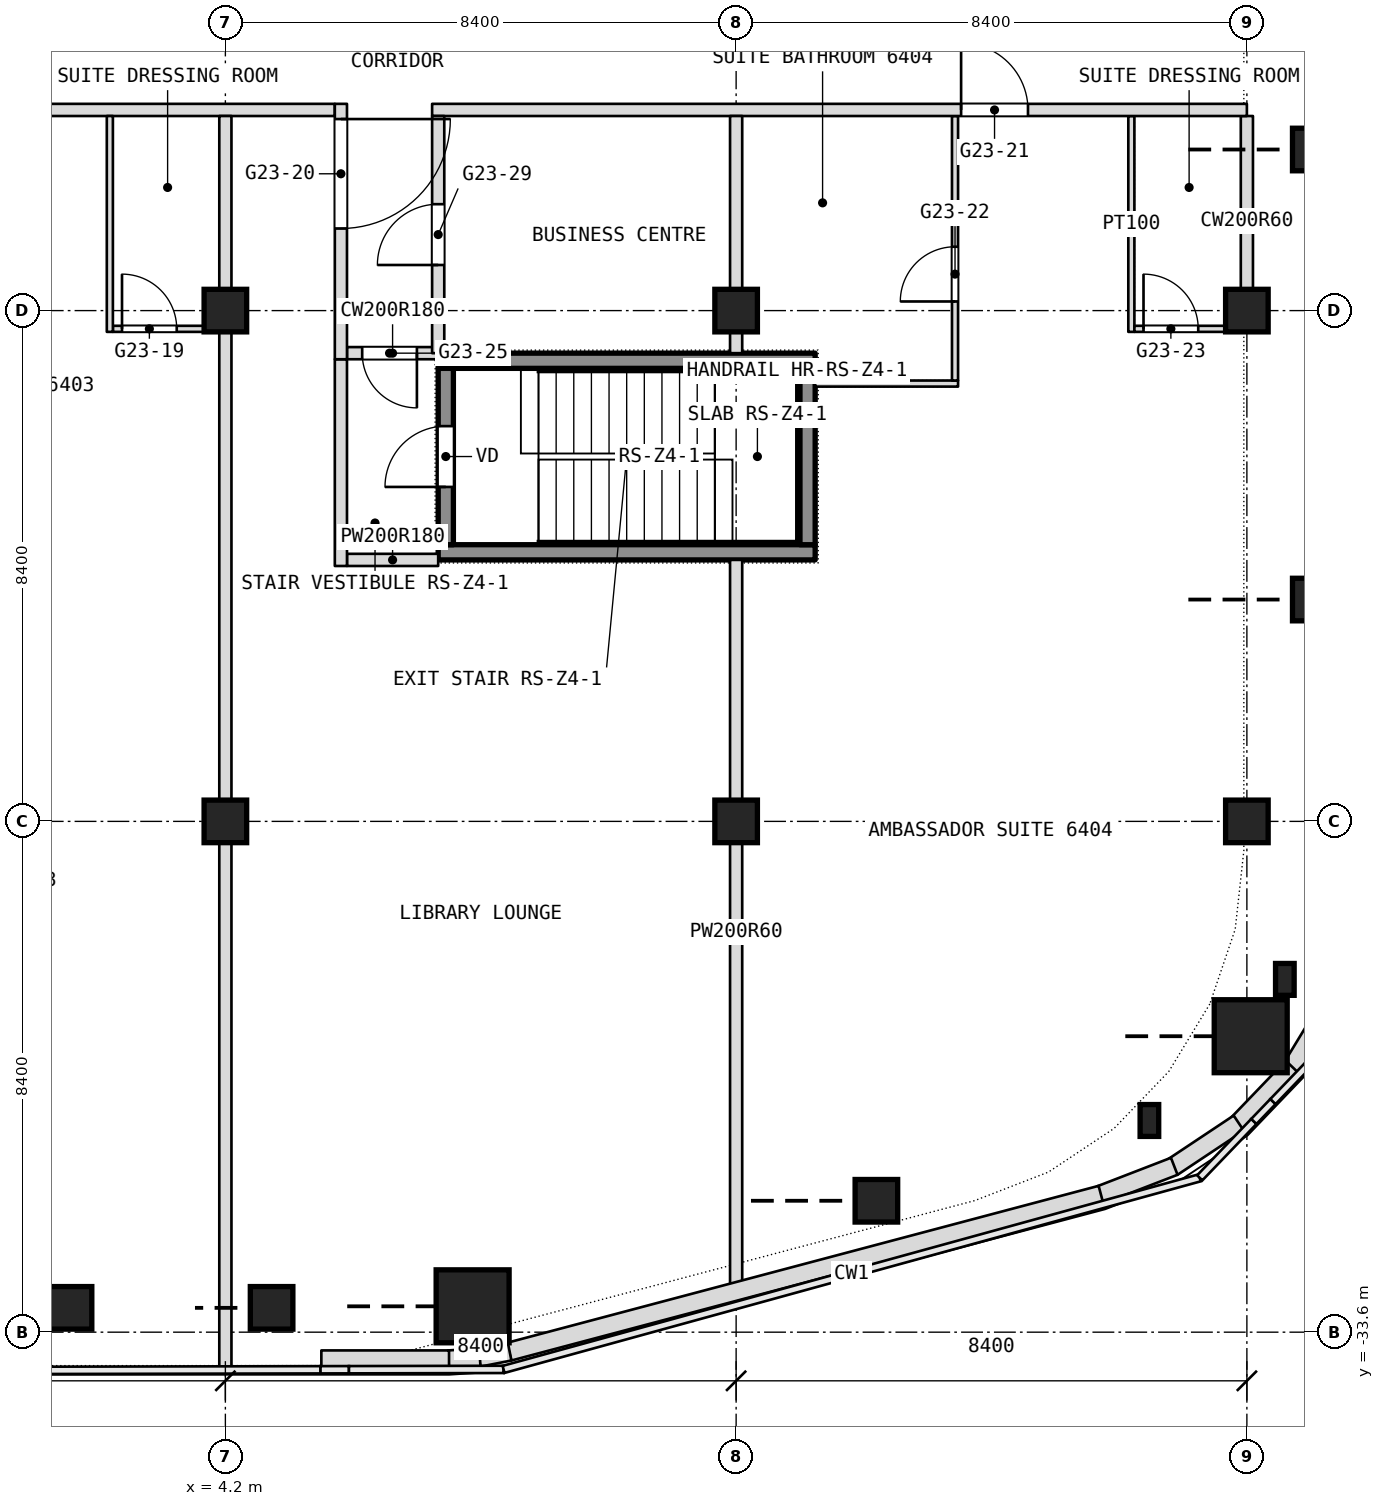
"""IFC4 building model, lengths in metres.
Left out: names, types, materials, properties, quantities, classifications, styles, units other than length and angle.
Written with IfcOpenShell. Run it as: python <this file> out.ifc"""

import sys

from ifc_helpers import new_model, si_unit, direction, frame, frame_2d, origin, origin_2d, place, context, subcontext, project, spatial, rectangle, i_section, extrude, element, fill, save


model = new_model("IFC4")
c1 = context("Model", 3, precision=1e-05, world=origin(), true_north=direction((0.0, 1.0)))
c2 = subcontext(c1, "Body", "Model", "MODEL_VIEW")
j1 = project(units=[si_unit("LENGTHUNIT", "METRE"), si_unit("PLANEANGLEUNIT", "RADIAN")], contexts=[c1])
p1 = place(None, origin())
s1 = spatial("IfcSite", under=j1, at=p1, CompositionType="ELEMENT")
p2 = place(p1, origin())
s2 = spatial("IfcBuilding", under=s1, at=p2, CompositionType="ELEMENT")
p3 = place(p2, frame((0.0, 0.0, 277.7)))
s3 = spatial("IfcBuildingStorey", under=s2, at=p3, CompositionType="ELEMENT", Elevation=277.7)
for number, where, z_axis, x_axis in (
    (1, (4.2, -25.2, 0.0), (0.0, 0.0, 1.0), (1.0, 0.0, 0.0)),
    (2, (4.2, -16.8, 0.0), (0.0, 0.0, 1.0), (1.0, 0.0, 0.0)),
    (3, (12.6, -25.2, 0.0), (0.0, 0.0, 1.0), (1.0, 0.0, 0.0)),
    (4, (12.6, -16.8, 0.0), (0.0, 0.0, 1.0), (1.0, 0.0, 0.0)),
):
    element("IfcColumn", number, at=place(p3, frame(where, z_axis=z_axis, x_axis=x_axis)), inside=s3, PredefinedType="COLUMN", context=c2, shape_type="SweptSolid", body=[
        extrude(rectangle(XDim=0.7, YDim=0.7, at=origin_2d()), origin(), (0.0, 0.0, 1.0), 3.6),
    ])
for number, where, z_axis, x_axis in (
    (5, (21.0, -25.2, 0.0), (0.0, 0.0, 1.0), (1.0, 0.0, 0.0)),
    (6, (21.0, -16.8, 0.0), (0.0, 0.0, 1.0), (1.0, 0.0, 0.0)),
):
    element("IfcColumn", number, at=place(p3, frame(where, z_axis=z_axis, x_axis=x_axis)), inside=s3, PredefinedType="COLUMN", context=c2, shape_type="SweptSolid", body=[
        extrude(rectangle(XDim=0.7, YDim=0.7, at=origin_2d()), origin(), (0.0, 0.0, 1.0), 3.34),
    ])
for number, where, z_axis, x_axis in (
    (7, (22.1, -14.151, 0.0), (0.0, 0.0, 1.0), (1.0, 0.0, 0.0)),
    (8, (22.1, -21.552, 0.0), (0.0, 0.0, 1.0), (1.0, 0.0, 0.0)),
):
    element("IfcColumn", number, at=place(p3, frame(where, z_axis=z_axis, x_axis=x_axis)), inside=s3, PredefinedType="COLUMN", context=c2, shape_type="SweptSolid", body=[
        extrude(i_section(OverallWidth=0.306, OverallDepth=0.524, WebThickness=0.024, FlangeThickness=0.04, FilletRadius=0.027, at=origin_2d()), origin(), (0.0, 0.0, 1.0), 2.94),
    ])
p4 = place(p3, frame((21.625, -27.799, -0.26), z_axis=(0.0, 0.0, 1.0), x_axis=(1.0, 0.0, 0.0)))
e9 = element("IfcColumn", 9, at=p4, inside=s3, PredefinedType="COLUMN", context=c2, shape_type="SweptSolid", body=[
    extrude(i_section(OverallWidth=0.306, OverallDepth=0.524, WebThickness=0.024, FlangeThickness=0.04, FilletRadius=0.027, at=origin_2d()), origin(), (0.0, 0.0, 1.0), 3.2),
])
p5 = place(p3, frame((21.063, -28.733, 0.0), z_axis=(0.0, 0.0, 1.0), x_axis=(1.0, 0.0, 0.0)))
e10 = element("IfcColumn", 10, at=p5, inside=s3, PredefinedType="COLUMN", context=c2, shape_type="SweptSolid", body=[
    extrude(i_section(OverallWidth=0.306, OverallDepth=0.524, WebThickness=0.024, FlangeThickness=0.04, FilletRadius=0.027, at=origin_2d()), origin(), (0.0, 0.0, 1.0), 2.94),
])
p6 = place(p3, frame((19.397, -30.119, -0.26), z_axis=(0.0, 0.0, 1.0), x_axis=(1.0, 0.0, 0.0)))
e11 = element("IfcColumn", 11, at=p6, inside=s3, PredefinedType="COLUMN", context=c2, shape_type="SweptSolid", body=[
    extrude(i_section(OverallWidth=0.306, OverallDepth=0.524, WebThickness=0.024, FlangeThickness=0.04, FilletRadius=0.027, at=origin_2d()), origin(), (0.0, 0.0, 1.0), 3.2),
])
for number, where, z_axis, x_axis in (
    (12, (14.907, -31.439, 0.0), (0.0, 0.0, 1.0), (1.0, 0.0, 0.0)),
    (13, (8.266, -33.173, 0.0), (0.0, 0.0, 1.0), (1.0, 0.0, 0.0)),
):
    element("IfcColumn", number, at=place(p3, frame(where, z_axis=z_axis, x_axis=x_axis)), inside=s3, PredefinedType="COLUMN", context=c2, shape_type="SweptSolid", body=[
        extrude(i_section(OverallWidth=0.306, OverallDepth=0.524, WebThickness=0.024, FlangeThickness=0.04, FilletRadius=0.027, at=origin_2d()), origin(), (0.0, 0.0, 1.0), 2.94),
    ])
p7 = place(p3, frame((21.0, -17.05, 0.0), z_axis=(0.0, 0.0, 1.0), x_axis=(0.0, 1.0, 0.0)))
e14 = element("IfcWall", 14, at=p7, inside=s3, PredefinedType="PARTITIONING", context=c2, shape_type="SweptSolid", body=[
    extrude(rectangle(XDim=3.45, YDim=0.2, at=frame_2d((1.725, 0.0))), origin(), (0.0, 0.0, 1.0), 3.34),
])
p8 = place(p3, frame((6.2, -20.9, 0.0), z_axis=(0.0, 0.0, 1.0), x_axis=(1.0, 0.0, 0.0)))
e15 = element("IfcWall", 15, at=p8, inside=s3, PredefinedType="PARTITIONING", context=c2, shape_type="SweptSolid", body=[
    extrude(rectangle(XDim=1.5, YDim=0.2, at=frame_2d((0.75, 0.0))), origin(), (0.0, 0.0, 1.0), 3.34),
])
p9 = place(p3, frame((19.1, -17.15, 0.0), z_axis=(0.0, 0.0, 1.0), x_axis=(0.0, 1.0, 0.0)))
e16 = element("IfcWall", 16, at=p9, inside=s3, PredefinedType="PARTITIONING", context=c2, shape_type="SweptSolid", body=[
    extrude(rectangle(XDim=3.55, YDim=0.1, at=frame_2d((1.775, 0.0))), origin(), (0.0, 0.0, 1.0), 3.34),
])
p10 = place(p3, frame((13.9, -18.0, 0.0), z_axis=(0.0, 0.0, 1.0), x_axis=(1.0, 0.0, 0.0)))
e17 = element("IfcWall", 17, at=p10, inside=s3, PredefinedType="PARTITIONING", context=c2, shape_type="SweptSolid", body=[
    extrude(rectangle(XDim=2.35, YDim=0.1, at=frame_2d((1.175, 0.0))), origin(), (0.0, 0.0, 1.0), 3.34),
])
p11 = place(p3, frame((6.2, -17.5, 0.0), z_axis=(0.0, 0.0, 1.0), x_axis=(1.0, 0.0, 0.0)))
e18 = element("IfcWall", 18, at=p11, inside=s3, PredefinedType="PARTITIONING", context=c2, shape_type="SweptSolid", body=[
    extrude(rectangle(XDim=1.5, YDim=0.2, at=frame_2d((0.75, 0.0))), origin(), (0.0, 0.0, 1.0), 3.34),
])
p12 = place(p11, frame((0.25, 0.0, 0.0)))
e19 = element("IfcOpeningElement", 19, at=p12, cuts=e18, PredefinedType="OPENING", context=c2, shape_type="SweptSolid", body=[
    extrude(rectangle(XDim=0.9, YDim=2.1, at=frame_2d((0.45, 1.05))), frame((0.0, 0.1, 0.0), z_axis=(0.0, -1.0, 0.0), x_axis=(1.0, 0.0, 0.0)), (0.0, 0.0, 1.0), 0.2),
])
p13 = place(p3, frame((2.35, -17.1, 0.0), z_axis=(0.0, 0.0, 1.0), x_axis=(1.0, 0.0, 0.0)))
e20 = element("IfcWall", 20, at=p13, inside=s3, PredefinedType="PARTITIONING", context=c2, shape_type="SweptSolid", body=[
    extrude(rectangle(XDim=1.95, YDim=0.1, at=frame_2d((0.975, 0.0))), origin(), (0.0, 0.0, 1.0), 3.34),
])
p14 = place(p13, frame((0.15, 0.0, 0.0)))
e21 = element("IfcOpeningElement", 21, at=p14, cuts=e20, PredefinedType="OPENING", context=c2, shape_type="SweptSolid", body=[
    extrude(rectangle(XDim=0.9, YDim=2.1, at=frame_2d((0.45, 1.05))), frame((0.0, 0.05, 0.0), z_axis=(0.0, -1.0, 0.0), x_axis=(1.0, 0.0, 0.0)), (0.0, 0.0, 1.0), 0.1),
])
p15 = place(p3, frame((19.15, -17.1, 0.0), z_axis=(0.0, 0.0, 1.0), x_axis=(1.0, 0.0, 0.0)))
e22 = element("IfcWall", 22, at=p15, inside=s3, PredefinedType="PARTITIONING", context=c2, shape_type="SweptSolid", body=[
    extrude(rectangle(XDim=1.85, YDim=0.1, at=frame_2d((0.925, 0.0))), origin(), (0.0, 0.0, 1.0), 3.34),
])
p16 = place(p15, frame((0.15, 0.0, 0.0)))
e23 = element("IfcOpeningElement", 23, at=p16, cuts=e22, PredefinedType="OPENING", context=c2, shape_type="SweptSolid", body=[
    extrude(rectangle(XDim=0.9, YDim=2.1, at=frame_2d((0.45, 1.05))), frame((0.0, 0.05, 0.0), z_axis=(0.0, -1.0, 0.0), x_axis=(1.0, 0.0, 0.0)), (0.0, 0.0, 1.0), 0.1),
])
p17 = place(p3, frame((16.2, -17.95, 0.0), z_axis=(0.0, 0.0, 1.0), x_axis=(0.0, 1.0, 0.0)))
e24 = element("IfcWall", 24, at=p17, inside=s3, PredefinedType="PARTITIONING", context=c2, shape_type="SweptSolid", body=[
    extrude(rectangle(XDim=4.35, YDim=0.1, at=frame_2d((2.175, 0.0))), origin(), (0.0, 0.0, 1.0), 3.34),
])
p18 = place(p17, frame((1.3, 0.0, 0.0)))
e25 = element("IfcOpeningElement", 25, at=p18, cuts=e24, PredefinedType="OPENING", context=c2, shape_type="SweptSolid", body=[
    extrude(rectangle(XDim=0.9, YDim=2.1, at=frame_2d((0.45, 1.05))), frame((0.0, 0.05, 0.0), z_axis=(0.0, -1.0, 0.0), x_axis=(1.0, 0.0, 0.0)), (0.0, 0.0, 1.0), 0.1),
])
p19 = place(p3, frame((-10.0, -13.5, 0.0), z_axis=(0.0, 0.0, 1.0), x_axis=(1.0, 0.0, 0.0)))
e26 = element("IfcWall", 26, at=p19, inside=s3, PredefinedType="PARTITIONING", context=c2, shape_type="SweptSolid", body=[
    extrude(rectangle(XDim=16.0, YDim=0.2, at=frame_2d((8.0, 0.0))), origin(), (0.0, 0.0, 1.0), 3.34),
])
p20 = place(p19, frame((0.25, 0.0, 0.0)))
e27 = element("IfcOpeningElement", 27, at=p20, cuts=e26, PredefinedType="OPENING", context=c2, shape_type="SweptSolid", body=[
    extrude(rectangle(XDim=1.1, YDim=2.1, at=frame_2d((0.55, 1.05))), frame((0.0, 0.1, 0.0), z_axis=(0.0, -1.0, 0.0), x_axis=(1.0, 0.0, 0.0)), (0.0, 0.0, 1.0), 0.2),
])
p21 = place(p19, frame((9.5, 0.0, 0.0)))
e28 = element("IfcOpeningElement", 28, at=p21, cuts=e26, PredefinedType="OPENING", context=c2, shape_type="SweptSolid", body=[
    extrude(rectangle(XDim=1.1, YDim=2.1, at=frame_2d((0.55, 1.05))), frame((0.0, 0.1, 0.0), z_axis=(0.0, -1.0, 0.0), x_axis=(1.0, 0.0, 0.0)), (0.0, 0.0, 1.0), 0.2),
])
p22 = place(p3, frame((7.6, -13.5, 0.0), z_axis=(0.0, 0.0, 1.0), x_axis=(1.0, 0.0, 0.0)))
e29 = element("IfcWall", 29, at=p22, inside=s3, PredefinedType="PARTITIONING", context=c2, shape_type="SweptSolid", body=[
    extrude(rectangle(XDim=13.4, YDim=0.2, at=frame_2d((6.7, 0.0))), origin(), (0.0, 0.0, 1.0), 3.34),
])
p23 = place(p22, frame((8.7, 0.0, 0.0)))
e30 = element("IfcOpeningElement", 30, at=p23, cuts=e29, PredefinedType="OPENING", context=c2, shape_type="SweptSolid", body=[
    extrude(rectangle(XDim=1.1, YDim=2.1, at=frame_2d((0.55, 1.05))), frame((0.0, 0.1, 0.0), z_axis=(0.0, -1.0, 0.0), x_axis=(1.0, 0.0, 0.0)), (0.0, 0.0, 1.0), 0.2),
])
p24 = place(p3, frame((12.6, -33.13, 0.0), z_axis=(0.0, 0.0, 1.0), x_axis=(0.0, 1.0, 0.0)))
e31 = element("IfcWall", 31, at=p24, inside=s3, PredefinedType="PARTITIONING", context=c2, shape_type="SweptSolid", body=[
    extrude(rectangle(XDim=12.23, YDim=0.2, at=frame_2d((6.115, 0.0))), origin(), (0.0, 0.0, 1.0), 3.34),
])
p25 = place(p3, frame((12.6, -17.5, 0.0), z_axis=(0.0, 0.0, 1.0), x_axis=(0.0, 1.0, 0.0)))
e32 = element("IfcWall", 32, at=p25, inside=s3, PredefinedType="PARTITIONING", context=c2, shape_type="SweptSolid", body=[
    extrude(rectangle(XDim=3.9, YDim=0.2, at=frame_2d((1.95, 0.0))), origin(), (0.0, 0.0, 1.0), 3.34),
])
p26 = place(p3, frame((7.7, -17.5, 0.0), z_axis=(0.0, 0.0, 1.0), x_axis=(0.0, 1.0, 0.0)))
e33 = element("IfcWall", 33, at=p26, inside=s3, PredefinedType="PARTITIONING", context=c2, shape_type="SweptSolid", body=[
    extrude(rectangle(XDim=3.9, YDim=0.2, at=frame_2d((1.95, 0.0))), origin(), (0.0, 0.0, 1.0), 3.34),
])
p27 = place(p26, frame((1.45, 0.0, 0.0)))
e34 = element("IfcOpeningElement", 34, at=p27, cuts=e33, PredefinedType="OPENING", context=c2, shape_type="SweptSolid", body=[
    extrude(rectangle(XDim=1.0, YDim=2.1, at=frame_2d((0.5, 1.05))), frame((0.0, 0.1, 0.0), z_axis=(0.0, -1.0, 0.0), x_axis=(1.0, 0.0, 0.0)), (0.0, 0.0, 1.0), 0.2),
])
p28 = place(p3, frame((6.1, -21.0, 0.0), z_axis=(0.0, 0.0, 1.0), x_axis=(0.0, 1.0, 0.0)))
e35 = element("IfcWall", 35, at=p28, inside=s3, PredefinedType="PARTITIONING", context=c2, shape_type="SweptSolid", body=[
    extrude(rectangle(XDim=3.4, YDim=0.2, at=frame_2d((1.7, 0.0))), origin(), (0.0, 0.0, 1.0), 3.34),
])
p29 = place(p3, frame((6.1, -17.6, 0.0), z_axis=(0.0, 0.0, 1.0), x_axis=(0.0, 1.0, 0.0)))
e36 = element("IfcWall", 36, at=p29, inside=s3, PredefinedType="PARTITIONING", context=c2, shape_type="SweptSolid", body=[
    extrude(rectangle(XDim=4.2, YDim=0.2, at=frame_2d((2.1, 0.0))), origin(), (0.0, 0.0, 1.0), 3.34),
])
p30 = place(p29, frame((2.15, 0.0, 0.0)))
e37 = element("IfcOpeningElement", 37, at=p30, cuts=e36, PredefinedType="OPENING", context=c2, shape_type="SweptSolid", body=[
    extrude(rectangle(XDim=1.8, YDim=2.1, at=frame_2d((0.9, 1.05))), frame((0.0, 0.1, 0.0), z_axis=(0.0, -1.0, 0.0), x_axis=(1.0, 0.0, 0.0)), (0.0, 0.0, 1.0), 0.2),
])
p31 = place(p3, frame((4.2, -34.2, 0.0), z_axis=(0.0, 0.0, 1.0), x_axis=(0.0, 1.0, 0.0)))
e38 = element("IfcWall", 38, at=p31, inside=s3, PredefinedType="PARTITIONING", context=c2, shape_type="SweptSolid", body=[
    extrude(rectangle(XDim=20.6, YDim=0.2, at=frame_2d((10.3, 0.0))), origin(), (0.0, 0.0, 1.0), 3.34),
])
p32 = place(p3, frame((2.3, -17.15, 0.0), z_axis=(0.0, 0.0, 1.0), x_axis=(0.0, 1.0, 0.0)))
e39 = element("IfcWall", 39, at=p32, inside=s3, PredefinedType="PARTITIONING", context=c2, shape_type="SweptSolid", body=[
    extrude(rectangle(XDim=3.55, YDim=0.1, at=frame_2d((1.775, 0.0))), origin(), (0.0, 0.0, 1.0), 3.34),
])
p33 = place(p3, frame((22.408, -28.146, 3.6), z_axis=(0.0, 0.0, 1.0), x_axis=(-0.519751696049, -0.854317373377, 0.0)))
e40 = element("IfcWall", 40, at=p33, inside=s3, PredefinedType="PARAPET", context=c2, shape_type="SweptSolid", body=[
    extrude(rectangle(XDim=1.309, YDim=0.3, at=frame_2d((0.655, 0.0))), origin(), (0.0, 0.0, 1.0), 1.1),
])
p34 = place(p3, frame((21.747, -29.239, 3.6), z_axis=(0.0, 0.0, 1.0), x_axis=(-0.692407566653, -0.721506591544, 0.0)))
e41 = element("IfcWall", 41, at=p34, inside=s3, PredefinedType="PARAPET", context=c2, shape_type="SweptSolid", body=[
    extrude(rectangle(XDim=1.309, YDim=0.3, at=frame_2d((0.654, 0.0))), origin(), (0.0, 0.0, 1.0), 1.1),
])
p35 = place(p3, frame((20.866, -30.162, 3.6), z_axis=(0.0, 0.0, 1.0), x_axis=(-0.832566414073, -0.55392523517, 0.0)))
e42 = element("IfcWall", 42, at=p35, inside=s3, PredefinedType="PARAPET", context=c2, shape_type="SweptSolid", body=[
    extrude(rectangle(XDim=1.309, YDim=0.3, at=frame_2d((0.655, 0.0))), origin(), (0.0, 0.0, 1.0), 1.1),
])
p36 = place(p3, frame((19.805, -30.872, 3.6), z_axis=(0.0, 0.0, 1.0), x_axis=(-0.932786730883, -0.360428792813, 0.0)))
e43 = element("IfcWall", 43, at=p36, inside=s3, PredefinedType="PARAPET", context=c2, shape_type="SweptSolid", body=[
    extrude(rectangle(XDim=1.309, YDim=0.3, at=frame_2d((0.654, 0.0))), origin(), (0.0, 0.0, 1.0), 1.1),
])
p37 = place(p3, frame((18.6, -31.339, 3.6), z_axis=(0.0, 0.0, 1.0), x_axis=(-0.966564868529, -0.256422220031, 0.0)))
e44 = element("IfcWall", 44, at=p37, inside=s3, PredefinedType="PARAPET", context=c2, shape_type="SweptSolid", body=[
    extrude(rectangle(XDim=10.071, YDim=0.3, at=frame_2d((5.036, 0.0))), origin(), (0.0, 0.0, 1.0), 1.1),
])
p38 = place(p3, frame((8.875, -33.919, 3.6), z_axis=(0.0, 0.0, 1.0), x_axis=(-0.981066960595, -0.193668838043, 0.0)))
e45 = element("IfcWall", 45, at=p38, inside=s3, PredefinedType="PARAPET", context=c2, shape_type="SweptSolid", body=[
    extrude(rectangle(XDim=0.518, YDim=0.3, at=frame_2d((0.259, 0.0))), origin(), (0.0, 0.0, 1.0), 1.1),
])
p39 = place(p3, frame((8.386, -34.017, 3.6), z_axis=(0.0, 0.0, 1.0), x_axis=(-0.997886085242, -0.064987390167, 0.0)))
e46 = element("IfcWall", 46, at=p39, inside=s3, PredefinedType="PARAPET", context=c2, shape_type="SweptSolid", body=[
    extrude(rectangle(XDim=0.518, YDim=0.3, at=frame_2d((0.259, 0.0))), origin(), (0.0, 0.0, 1.0), 1.1),
])
p40 = place(p3, frame((7.878, -34.05, 3.6), z_axis=(0.0, 0.0, 1.0), x_axis=(-1.0, 0.0, 0.0)))
e47 = element("IfcWall", 47, at=p40, inside=s3, PredefinedType="PARAPET", context=c2, shape_type="SweptSolid", body=[
    extrude(rectangle(XDim=2.1, YDim=0.3, at=frame_2d((1.05, 0.0))), origin(), (0.0, 0.0, 1.0), 1.1),
])
for number, where, z_axis, x_axis in (
    (48, (7.7, -20.775, 0.1), (0.0, 0.0, 1.0), (1.0, 0.0, 0.0)),
    (49, (7.7, -17.625, 0.1), (0.0, 0.0, 1.0), (1.0, 0.0, 0.0)),
):
    element("IfcWall", number, at=place(p3, frame(where, z_axis=z_axis, x_axis=x_axis)), inside=s3, PredefinedType="SHEAR", context=c2, shape_type="SweptSolid", body=[
        extrude(rectangle(XDim=6.2, YDim=0.25, at=frame_2d((3.1, 0.0))), origin(), (0.0, 0.0, 1.0), 3.6),
    ])
p41 = place(p3, frame((7.825, -20.65, 0.1), z_axis=(0.0, 0.0, 1.0), x_axis=(0.0, 1.0, 0.0)))
e50 = element("IfcWall", 50, at=p41, inside=s3, PredefinedType="SHEAR", context=c2, shape_type="SweptSolid", body=[
    extrude(rectangle(XDim=2.9, YDim=0.25, at=frame_2d((1.45, 0.0))), origin(), (0.0, 0.0, 1.0), 3.6),
])
p42 = place(p41, frame((0.95, 0.0, 0.0)))
e51 = element("IfcOpeningElement", 51, at=p42, cuts=e50, PredefinedType="OPENING", context=c2, shape_type="SweptSolid", body=[
    extrude(rectangle(XDim=1.0, YDim=2.1, at=frame_2d((0.5, 1.05))), frame((0.0, 0.125, 0.0), z_axis=(0.0, -1.0, 0.0), x_axis=(1.0, 0.0, 0.0)), (0.0, 0.0, 1.0), 0.25),
])
p43 = place(p3, frame((13.775, -20.65, 0.1), z_axis=(0.0, 0.0, 1.0), x_axis=(0.0, 1.0, 0.0)))
e52 = element("IfcWall", 52, at=p43, inside=s3, PredefinedType="SHEAR", context=c2, shape_type="SweptSolid", body=[
    extrude(rectangle(XDim=2.9, YDim=0.25, at=frame_2d((1.45, 0.0))), origin(), (0.0, 0.0, 1.0), 3.6),
])
p44 = place(p14, origin())
e53 = element("IfcDoor", 53, at=p44, inside=s3, OperationType="SINGLE_SWING_LEFT", PredefinedType="DOOR", context=c2, shape_type="SweptSolid", body=[
    extrude(rectangle(XDim=0.9, YDim=2.1, at=frame_2d((0.45, 1.05))), frame((0.0, 0.025, 0.0), z_axis=(0.0, -1.0, 0.0), x_axis=(1.0, 0.0, 0.0)), (0.0, 0.0, 1.0), 0.05),
])
fill(e21, e53)
p45 = place(p30, origin())
e54 = element("IfcDoor", 54, at=p45, inside=s3, OperationType="DOUBLE_DOOR_SINGLE_SWING", PredefinedType="DOOR", context=c2, shape_type="SweptSolid", body=[
    extrude(rectangle(XDim=1.8, YDim=2.1, at=frame_2d((0.9, 1.05))), frame((0.0, 0.025, 0.0), z_axis=(0.0, -1.0, 0.0), x_axis=(1.0, 0.0, 0.0)), (0.0, 0.0, 1.0), 0.05),
])
fill(e37, e54)
p46 = place(p23, origin())
e55 = element("IfcDoor", 55, at=p46, inside=s3, OperationType="SINGLE_SWING_RIGHT", PredefinedType="DOOR", context=c2, shape_type="SweptSolid", body=[
    extrude(rectangle(XDim=1.1, YDim=2.1, at=frame_2d((0.55, 1.05))), frame((0.0, 0.025, 0.0), z_axis=(0.0, -1.0, 0.0), x_axis=(1.0, 0.0, 0.0)), (0.0, 0.0, 1.0), 0.05),
])
fill(e30, e55)
p47 = place(p18, origin())
e56 = element("IfcDoor", 56, at=p47, inside=s3, OperationType="SINGLE_SWING_LEFT", PredefinedType="DOOR", context=c2, shape_type="SweptSolid", body=[
    extrude(rectangle(XDim=0.9, YDim=2.1, at=frame_2d((0.45, 1.05))), frame((0.0, 0.025, 0.0), z_axis=(0.0, -1.0, 0.0), x_axis=(1.0, 0.0, 0.0)), (0.0, 0.0, 1.0), 0.05),
])
fill(e25, e56)
p48 = place(p16, origin())
e57 = element("IfcDoor", 57, at=p48, inside=s3, OperationType="SINGLE_SWING_LEFT", PredefinedType="DOOR", context=c2, shape_type="SweptSolid", body=[
    extrude(rectangle(XDim=0.9, YDim=2.1, at=frame_2d((0.45, 1.05))), frame((0.0, 0.025, 0.0), z_axis=(0.0, -1.0, 0.0), x_axis=(1.0, 0.0, 0.0)), (0.0, 0.0, 1.0), 0.05),
])
fill(e23, e57)
p49 = place(p12, origin())
e58 = element("IfcDoor", 58, at=p49, inside=s3, OperationType="SINGLE_SWING_LEFT", PredefinedType="DOOR", context=c2, shape_type="SweptSolid", body=[
    extrude(rectangle(XDim=0.9, YDim=2.1, at=frame_2d((0.45, 1.05))), frame((0.0, 0.025, 0.0), z_axis=(0.0, -1.0, 0.0), x_axis=(1.0, 0.0, 0.0)), (0.0, 0.0, 1.0), 0.05),
])
fill(e19, e58)
p50 = place(p27, origin())
e59 = element("IfcDoor", 59, at=p50, inside=s3, OperationType="SINGLE_SWING_LEFT", PredefinedType="DOOR", context=c2, shape_type="SweptSolid", body=[
    extrude(rectangle(XDim=1.0, YDim=2.1, at=frame_2d((0.5, 1.05))), frame((0.0, 0.025, 0.0), z_axis=(0.0, -1.0, 0.0), x_axis=(1.0, 0.0, 0.0)), (0.0, 0.0, 1.0), 0.05),
])
fill(e34, e59)
p51 = place(p42, origin())
e60 = element("IfcDoor", 60, at=p51, inside=s3, OperationType="SINGLE_SWING_LEFT", PredefinedType="DOOR", context=c2, shape_type="SweptSolid", body=[
    extrude(rectangle(XDim=1.0, YDim=2.1, at=frame_2d((0.5, 1.05))), frame((0.0, 0.025, 0.0), z_axis=(0.0, -1.0, 0.0), x_axis=(1.0, 0.0, 0.0)), (0.0, 0.0, 1.0), 0.05),
])
fill(e51, e60)
save(model, sys.argv[1])
